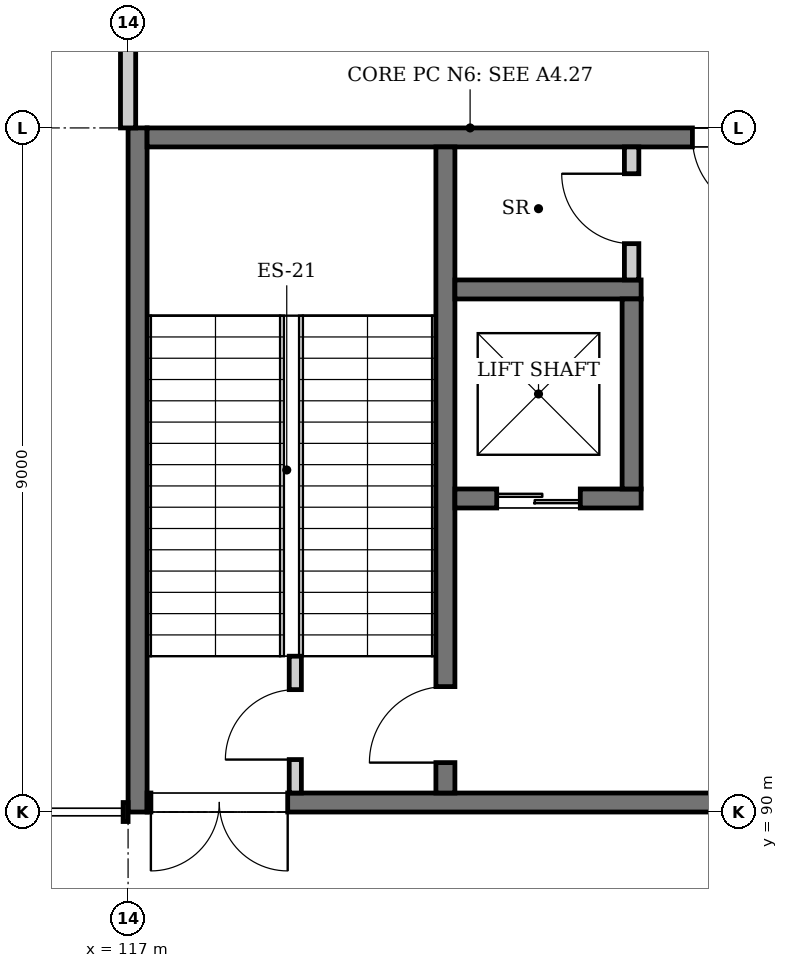
"""IFC4 building model, lengths in metres.
Left out: names, types, materials, properties, quantities, classifications, styles, units other than length and angle.
Written with IfcOpenShell. Run it as: python <this file> out.ifc"""

import sys

from ifc_helpers import new_model, si_unit, direction, frame, frame_2d, origin, place, context, subcontext, project, spatial, rectangle, extrude, element, fill, save


model = new_model("IFC4")
c1 = context("Model", 3, precision=1e-05, world=origin(), true_north=direction((0.0, 1.0)))
c2 = subcontext(c1, "Body", "Model", "MODEL_VIEW")
j1 = project(units=[si_unit("LENGTHUNIT", "METRE"), si_unit("PLANEANGLEUNIT", "RADIAN")], contexts=[c1])
p1 = place(None, origin())
s1 = spatial("IfcSite", under=j1, at=p1, CompositionType="ELEMENT")
p2 = place(p1, origin())
s2 = spatial("IfcBuilding", under=s1, at=p2, CompositionType="ELEMENT")
p3 = place(p2, origin())
s3 = spatial("IfcBuildingStorey", under=s2, at=p3, CompositionType="ELEMENT", Elevation=0.0)
p4 = place(p3, frame((117.125, 90.0, 0.0), z_axis=(0.0, 0.0, 1.0), x_axis=(0.0, 1.0, 0.0)))
e1 = element("IfcWall", 1, at=p4, inside=s3, PredefinedType="SHEAR", context=c2, shape_type="SweptSolid", body=[
    extrude(rectangle(XDim=9.0, YDim=0.25, at=frame_2d((4.5, 0.0))), origin(), (0.0, 0.0, 1.0), 6.0),
])
p5 = place(p3, frame((117.25, 90.125, 0.0), z_axis=(0.0, 0.0, 1.0), x_axis=(1.0, 0.0, 0.0)))
e2 = element("IfcWall", 2, at=p5, inside=s3, PredefinedType="SHEAR", context=c2, shape_type="SweptSolid", body=[
    extrude(rectangle(XDim=8.5, YDim=0.25, at=frame_2d((4.25, 0.0))), origin(), (0.0, 0.0, 1.0), 6.0),
])
p6 = place(p5, frame((0.05, 0.0, 0.0)))
e3 = element("IfcOpeningElement", 3, at=p6, cuts=e2, PredefinedType="OPENING", context=c2, shape_type="SweptSolid", body=[
    extrude(rectangle(XDim=1.8, YDim=2.4, at=frame_2d((0.9, 1.2))), frame((0.0, 0.135, 0.0), z_axis=(0.0, -1.0, 0.0), x_axis=(1.0, 0.0, 0.0)), (0.0, 0.0, 1.0), 0.27),
])
p7 = place(p3, frame((117.25, 98.875, 0.0), z_axis=(0.0, 0.0, 1.0), x_axis=(1.0, 0.0, 0.0)))
e4 = element("IfcWall", 4, at=p7, inside=s3, PredefinedType="SHEAR", context=c2, shape_type="SweptSolid", body=[
    extrude(rectangle(XDim=8.5, YDim=0.25, at=frame_2d((4.25, 0.0))), origin(), (0.0, 0.0, 1.0), 6.0),
])
p8 = place(p7, frame((7.175, 0.0, 0.0)))
e5 = element("IfcOpeningElement", 5, at=p8, cuts=e4, PredefinedType="OPENING", context=c2, shape_type="SweptSolid", body=[
    extrude(rectangle(XDim=1.0, YDim=2.1, at=frame_2d((0.5, 1.05))), frame((0.0, 0.135, 0.0), z_axis=(0.0, -1.0, 0.0), x_axis=(1.0, 0.0, 0.0)), (0.0, 0.0, 1.0), 0.27),
])
p9 = place(p3, frame((121.175, 90.25, 0.0), z_axis=(0.0, 0.0, 1.0), x_axis=(0.0, 1.0, 0.0)))
e6 = element("IfcWall", 6, at=p9, inside=s3, PredefinedType="SOLIDWALL", context=c2, shape_type="SweptSolid", body=[
    extrude(rectangle(XDim=8.5, YDim=0.25, at=frame_2d((4.25, 0.0))), origin(), (0.0, 0.0, 1.0), 5.75),
])
p10 = place(p9, frame((0.4, 0.0, 0.0)))
e7 = element("IfcOpeningElement", 7, at=p10, cuts=e6, PredefinedType="OPENING", context=c2, shape_type="SweptSolid", body=[
    extrude(rectangle(XDim=1.0, YDim=2.1, at=frame_2d((0.5, 1.05))), frame((0.0, 0.135, 0.0), z_axis=(0.0, -1.0, 0.0), x_axis=(1.0, 0.0, 0.0)), (0.0, 0.0, 1.0), 0.27),
])
p11 = place(p3, frame((121.3, 94.125, 0.0), z_axis=(0.0, 0.0, 1.0), x_axis=(1.0, 0.0, 0.0)))
e8 = element("IfcWall", 8, at=p11, inside=s3, PredefinedType="SOLIDWALL", context=c2, shape_type="SweptSolid", body=[
    extrude(rectangle(XDim=2.45, YDim=0.25, at=frame_2d((1.225, 0.0))), origin(), (0.0, 0.0, 1.0), 6.0),
])
p12 = place(p11, frame((0.55, 0.0, 0.0)))
e9 = element("IfcOpeningElement", 9, at=p12, cuts=e8, PredefinedType="OPENING", context=c2, shape_type="SweptSolid", body=[
    extrude(rectangle(XDim=1.1, YDim=2.1, at=frame_2d((0.55, 1.05))), frame((0.0, 0.135, 0.0), z_axis=(0.0, -1.0, 0.0), x_axis=(1.0, 0.0, 0.0)), (0.0, 0.0, 1.0), 0.27),
])
p13 = place(p3, frame((121.3, 96.875, 0.0), z_axis=(0.0, 0.0, 1.0), x_axis=(1.0, 0.0, 0.0)))
e10 = element("IfcWall", 10, at=p13, inside=s3, PredefinedType="SOLIDWALL", context=c2, shape_type="SweptSolid", body=[
    extrude(rectangle(XDim=2.45, YDim=0.25, at=frame_2d((1.225, 0.0))), origin(), (0.0, 0.0, 1.0), 6.0),
])
p14 = place(p3, frame((123.625, 94.25, 0.0), z_axis=(0.0, 0.0, 1.0), x_axis=(0.0, 1.0, 0.0)))
e11 = element("IfcWall", 11, at=p14, inside=s3, PredefinedType="SOLIDWALL", context=c2, shape_type="SweptSolid", body=[
    extrude(rectangle(XDim=2.5, YDim=0.25, at=frame_2d((1.25, 0.0))), origin(), (0.0, 0.0, 1.0), 6.0),
])
p15 = place(p3, frame((119.2, 90.25, 0.0), z_axis=(0.0, 0.0, 1.0), x_axis=(0.0, 1.0, 0.0)))
e12 = element("IfcWall", 12, at=p15, inside=s3, PredefinedType="PARTITIONING", context=c2, shape_type="SweptSolid", body=[
    extrude(rectangle(XDim=1.8, YDim=0.16, at=frame_2d((0.9, 0.0))), origin(), (0.0, 0.0, 1.0), 5.75),
])
p16 = place(p15, frame((0.44, 0.0, 0.0)))
e13 = element("IfcOpeningElement", 13, at=p16, cuts=e12, PredefinedType="OPENING", context=c2, shape_type="SweptSolid", body=[
    extrude(rectangle(XDim=0.92, YDim=2.1, at=frame_2d((0.46, 1.05))), frame((0.0, 0.09, 0.0), z_axis=(0.0, -1.0, 0.0), x_axis=(1.0, 0.0, 0.0)), (0.0, 0.0, 1.0), 0.18),
])
p17 = place(p3, frame((117.0, 99.0, 0.0), z_axis=(0.0, 0.0, 1.0), x_axis=(0.0, 1.0, 0.0)))
e14 = element("IfcWall", 14, at=p17, inside=s3, PredefinedType="PARTITIONING", context=c2, shape_type="SweptSolid", body=[
    extrude(rectangle(XDim=8.836, YDim=0.2, at=frame_2d((4.418, 0.0))), origin(), (0.0, 0.0, 1.0), 5.322),
])
p18 = place(p3, frame((123.625, 97.0, 0.0), z_axis=(0.0, 0.0, 1.0), x_axis=(0.0, 1.0, 0.0)))
e15 = element("IfcWall", 15, at=p18, inside=s3, PredefinedType="PARTITIONING", context=c2, shape_type="SweptSolid", body=[
    extrude(rectangle(XDim=1.75, YDim=0.19, at=frame_2d((0.875, 0.0))), origin(), (0.0, 0.0, 1.0), 5.75),
])
p19 = place(p18, frame((0.478, 0.0, 0.0)))
e16 = element("IfcOpeningElement", 16, at=p19, cuts=e15, PredefinedType="OPENING", context=c2, shape_type="SweptSolid", body=[
    extrude(rectangle(XDim=0.92, YDim=2.1, at=frame_2d((0.46, 1.05))), frame((0.0, 0.105, 0.0), z_axis=(0.0, -1.0, 0.0), x_axis=(1.0, 0.0, 0.0)), (0.0, 0.0, 1.0), 0.21),
])
p20 = place(p6, frame((1.8, 0.0, 0.0), z_axis=(0.0, 0.0, 1.0), x_axis=(-1.0, 0.0, 0.0)))
e17 = element("IfcDoor", 17, at=p20, inside=s3, OperationType="DOUBLE_DOOR_SINGLE_SWING", PredefinedType="DOOR", context=c2, shape_type="SweptSolid", body=[
    extrude(rectangle(XDim=1.8, YDim=2.4, at=frame_2d((0.9, 1.2))), frame((0.0, 0.025, 0.0), z_axis=(0.0, -1.0, 0.0), x_axis=(1.0, 0.0, 0.0)), (0.0, 0.0, 1.0), 0.05),
])
fill(e3, e17)
p21 = place(p12, origin())
e18 = element("IfcDoor", 18, at=p21, inside=s3, OperationType="DOUBLE_DOOR_SLIDING", PredefinedType="DOOR", context=c2, shape_type="SweptSolid", body=[
    extrude(rectangle(XDim=1.1, YDim=2.1, at=frame_2d((0.55, 1.05))), frame((0.0, 0.025, 0.0), z_axis=(0.0, -1.0, 0.0), x_axis=(1.0, 0.0, 0.0)), (0.0, 0.0, 1.0), 0.05),
])
fill(e9, e18)
p22 = place(p10, origin())
e19 = element("IfcDoor", 19, at=p22, inside=s3, OperationType="SINGLE_SWING_LEFT", PredefinedType="DOOR", context=c2, shape_type="SweptSolid", body=[
    extrude(rectangle(XDim=1.0, YDim=2.1, at=frame_2d((0.5, 1.05))), frame((0.0, 0.025, 0.0), z_axis=(0.0, -1.0, 0.0), x_axis=(1.0, 0.0, 0.0)), (0.0, 0.0, 1.0), 0.05),
])
fill(e7, e19)
p23 = place(p19, origin())
e20 = element("IfcDoor", 20, at=p23, inside=s3, OperationType="SINGLE_SWING_RIGHT", PredefinedType="DOOR", context=c2, shape_type="SweptSolid", body=[
    extrude(rectangle(XDim=0.92, YDim=2.1, at=frame_2d((0.46, 1.05))), frame((0.0, 0.025, 0.0), z_axis=(0.0, -1.0, 0.0), x_axis=(1.0, 0.0, 0.0)), (0.0, 0.0, 1.0), 0.05),
])
fill(e16, e20)
p24 = place(p16, origin())
e21 = element("IfcDoor", 21, at=p24, inside=s3, OperationType="SINGLE_SWING_LEFT", PredefinedType="DOOR", context=c2, shape_type="SweptSolid", body=[
    extrude(rectangle(XDim=0.92, YDim=2.1, at=frame_2d((0.46, 1.05))), frame((0.0, 0.025, 0.0), z_axis=(0.0, -1.0, 0.0), x_axis=(1.0, 0.0, 0.0)), (0.0, 0.0, 1.0), 0.05),
])
fill(e13, e21)
p25 = place(p8, frame((1.0, 0.0, 0.0), z_axis=(0.0, 0.0, 1.0), x_axis=(-1.0, 0.0, 0.0)))
e22 = element("IfcDoor", 22, at=p25, inside=s3, OperationType="SINGLE_SWING_LEFT", PredefinedType="DOOR", context=c2, shape_type="SweptSolid", body=[
    extrude(rectangle(XDim=1.0, YDim=2.1, at=frame_2d((0.5, 1.05))), frame((0.0, 0.025, 0.0), z_axis=(0.0, -1.0, 0.0), x_axis=(1.0, 0.0, 0.0)), (0.0, 0.0, 1.0), 0.05),
])
fill(e5, e22)
save(model, sys.argv[1])
